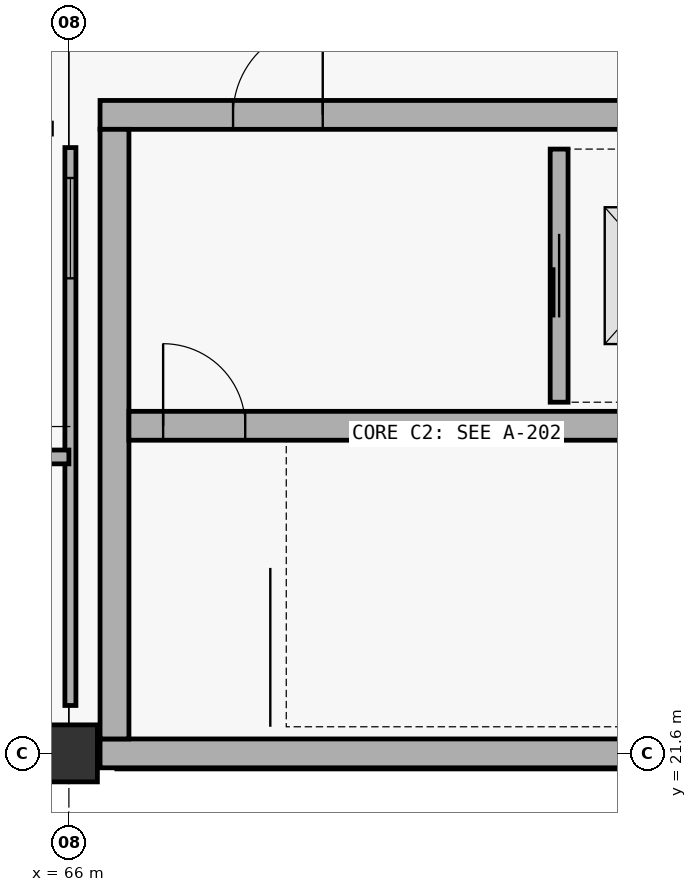
"""IFC4 building model, lengths in metres.
Left out: names, types, materials, properties, quantities, classifications, styles, units other than length and angle.
Written with IfcOpenShell. Run it as: python <this file> out.ifc"""

import sys

from ifc_helpers import new_model, si_unit, direction, frame, frame_2d, origin, origin_2d, place, context, subcontext, project, spatial, rectangle, extrude, element, fill, save


model = new_model("IFC4")
c1 = context("Model", 3, precision=1e-05, world=origin(), true_north=direction((0.0, 1.0)))
c2 = subcontext(c1, "Body", "Model", "MODEL_VIEW")
j1 = project(units=[si_unit("LENGTHUNIT", "METRE"), si_unit("PLANEANGLEUNIT", "RADIAN")], contexts=[c1])
p1 = place(None, origin())
s1 = spatial("IfcSite", under=j1, at=p1, CompositionType="ELEMENT")
p2 = place(p1, origin())
s2 = spatial("IfcBuilding", under=s1, at=p2, CompositionType="ELEMENT")
p3 = place(p2, frame((0.0, 0.0, 20.7)))
s3 = spatial("IfcBuildingStorey", under=s2, at=p3, CompositionType="ELEMENT", Elevation=20.7)
p4 = place(p3, frame((66.0, 21.6, 0.0), z_axis=(0.0, 0.0, 1.0), x_axis=(1.0, 0.0, 0.0)))
e1 = element("IfcColumn", 1, at=p4, inside=s3, PredefinedType="COLUMN", context=c2, shape_type="SweptSolid", body=[
    extrude(rectangle(XDim=0.75, YDim=0.75, at=origin_2d()), origin(), (0.0, 0.0, 1.0), 5.7),
])
p5 = place(p3, frame((66.41, 21.6, 0.0), z_axis=(0.0, 0.0, 1.0), x_axis=(1.0, 0.0, 0.0)))
e2 = element("IfcWall", 2, at=p5, inside=s3, PredefinedType="SHEAR", context=c2, shape_type="SweptSolid", body=[
    extrude(rectangle(XDim=9.38, YDim=0.38, at=frame_2d((4.69, 0.0))), origin(), (0.0, 0.0, 1.0), 5.7),
])
p6 = place(p3, frame((66.41, 30.0, 0.0), z_axis=(0.0, 0.0, 1.0), x_axis=(1.0, 0.0, 0.0)))
e3 = element("IfcWall", 3, at=p6, inside=s3, PredefinedType="SHEAR", context=c2, shape_type="SweptSolid", body=[
    extrude(rectangle(XDim=9.38, YDim=0.38, at=frame_2d((4.69, 0.0))), origin(), (0.0, 0.0, 1.0), 5.7),
])
p7 = place(p6, frame((1.75, 0.0, 0.0)))
e4 = element("IfcOpeningElement", 4, at=p7, cuts=e3, PredefinedType="OPENING", context=c2, shape_type="SweptSolid", body=[
    extrude(rectangle(XDim=1.18, YDim=2.24, at=frame_2d((0.59, 1.12))), frame((0.0, 0.2, 0.0), z_axis=(0.0, -1.0, 0.0), x_axis=(1.0, 0.0, 0.0)), (0.0, 0.0, 1.0), 0.4),
])
p8 = place(p3, frame((66.6, 21.79, 0.0), z_axis=(0.0, 0.0, 1.0), x_axis=(0.0, 1.0, 0.0)))
e5 = element("IfcWall", 5, at=p8, inside=s3, PredefinedType="SHEAR", context=c2, shape_type="SweptSolid", body=[
    extrude(rectangle(XDim=8.02, YDim=0.38, at=frame_2d((4.01, 0.0))), origin(), (0.0, 0.0, 1.0), 5.7),
])
p9 = place(p3, frame((66.79, 25.91, 0.0), z_axis=(0.0, 0.0, 1.0), x_axis=(1.0, 0.0, 0.0)))
e6 = element("IfcWall", 6, at=p9, inside=s3, PredefinedType="SHEAR", context=c2, shape_type="SweptSolid", body=[
    extrude(rectangle(XDim=8.62, YDim=0.38, at=frame_2d((4.31, 0.0))), origin(), (0.0, 0.0, 1.0), 5.7),
])
p10 = place(p9, frame((0.45, 0.0, 0.0)))
e7 = element("IfcOpeningElement", 7, at=p10, cuts=e6, PredefinedType="OPENING", context=c2, shape_type="SweptSolid", body=[
    extrude(rectangle(XDim=1.08, YDim=2.18, at=frame_2d((0.54, 1.09))), frame((0.0, 0.2, 0.0), z_axis=(0.0, -1.0, 0.0), x_axis=(1.0, 0.0, 0.0)), (0.0, 0.0, 1.0), 0.4),
])
p11 = place(p3, frame((72.45, 26.22, 0.0), z_axis=(0.0, 0.0, 1.0), x_axis=(0.0, 1.0, 0.0)))
e8 = element("IfcWall", 8, at=p11, inside=s3, PredefinedType="PARTITIONING", context=c2, shape_type="SweptSolid", body=[
    extrude(rectangle(XDim=3.33, YDim=0.235, at=frame_2d((1.665, 0.0))), origin(), (0.0, 0.0, 1.0), 4.98),
])
p12 = place(p11, frame((1.115, 0.0, 0.0)))
e9 = element("IfcOpeningElement", 9, at=p12, cuts=e8, PredefinedType="OPENING", context=c2, shape_type="SweptSolid", body=[
    extrude(rectangle(XDim=1.1, YDim=2.2, at=frame_2d((0.55, 1.1))), frame((0.0, 0.127, 0.0), z_axis=(0.0, -1.0, 0.0), x_axis=(1.0, 0.0, 0.0)), (0.0, 0.0, 1.0), 0.255),
])
p13 = place(p3, frame((66.02, 22.23, 0.0), z_axis=(0.0, 0.0, 1.0), x_axis=(0.0, 1.0, 0.0)))
e10 = element("IfcWall", 10, at=p13, inside=s3, PredefinedType="PARTITIONING", context=c2, shape_type="SweptSolid", body=[
    extrude(rectangle(XDim=7.34, YDim=0.145, at=frame_2d((3.67, 0.0))), origin(), (0.0, 0.0, 1.0), 4.98),
])
p14 = place(p13, frame((5.62, 0.0, 0.9)))
e11 = element("IfcOpeningElement", 11, at=p14, cuts=e10, PredefinedType="OPENING", context=c2, shape_type="SweptSolid", body=[
    extrude(rectangle(XDim=1.32, YDim=1.5, at=frame_2d((0.66, 0.75))), frame((0.0, 0.083, 0.0), z_axis=(0.0, -1.0, 0.0), x_axis=(1.0, 0.0, 0.0)), (0.0, 0.0, 1.0), 0.165),
])
p15 = place(p3, frame((60.0, 25.5, 0.0), z_axis=(0.0, 0.0, 1.0), x_axis=(1.0, 0.0, 0.0)))
e12 = element("IfcWall", 12, at=p15, inside=s3, PredefinedType="MOVABLE", context=c2, shape_type="SweptSolid", body=[
    extrude(rectangle(XDim=6.0, YDim=0.182, at=frame_2d((3.0, 0.0))), origin(), (0.0, 0.0, 1.0), 3.2),
])
p16 = place(p10, origin())
e13 = element("IfcDoor", 13, at=p16, inside=s3, OperationType="SINGLE_SWING_LEFT", PredefinedType="DOOR", context=c2, shape_type="SweptSolid", body=[
    extrude(rectangle(XDim=1.08, YDim=2.18, at=frame_2d((0.54, 1.09))), frame((0.0, 0.025, 0.0), z_axis=(0.0, -1.0, 0.0), x_axis=(1.0, 0.0, 0.0)), (0.0, 0.0, 1.0), 0.05),
])
fill(e7, e13)
p17 = place(p7, origin())
e14 = element("IfcDoor", 14, at=p17, inside=s3, OperationType="SINGLE_SWING_RIGHT", PredefinedType="DOOR", context=c2, shape_type="SweptSolid", body=[
    extrude(rectangle(XDim=1.18, YDim=2.24, at=frame_2d((0.59, 1.12))), frame((0.0, 0.025, 0.0), z_axis=(0.0, -1.0, 0.0), x_axis=(1.0, 0.0, 0.0)), (0.0, 0.0, 1.0), 0.05),
])
fill(e4, e14)
p18 = place(p12, origin())
e15 = element("IfcDoor", 15, at=p18, inside=s3, OperationType="SLIDING_TO_LEFT", PredefinedType="DOOR", context=c2, shape_type="SweptSolid", body=[
    extrude(rectangle(XDim=1.1, YDim=2.2, at=frame_2d((0.55, 1.1))), frame((0.0, 0.025, 0.0), z_axis=(0.0, -1.0, 0.0), x_axis=(1.0, 0.0, 0.0)), (0.0, 0.0, 1.0), 0.05),
])
fill(e9, e15)
p19 = place(p14, origin())
e16 = element("IfcWindow", 16, at=p19, inside=s3, PartitioningType="SINGLE_PANEL", PredefinedType="WINDOW", context=c2, shape_type="SweptSolid", body=[
    extrude(rectangle(XDim=1.32, YDim=1.5, at=frame_2d((0.66, 0.75))), frame((0.0, 0.03, 0.0), z_axis=(0.0, -1.0, 0.0), x_axis=(1.0, 0.0, 0.0)), (0.0, 0.0, 1.0), 0.06),
])
fill(e11, e16)
save(model, sys.argv[1])
